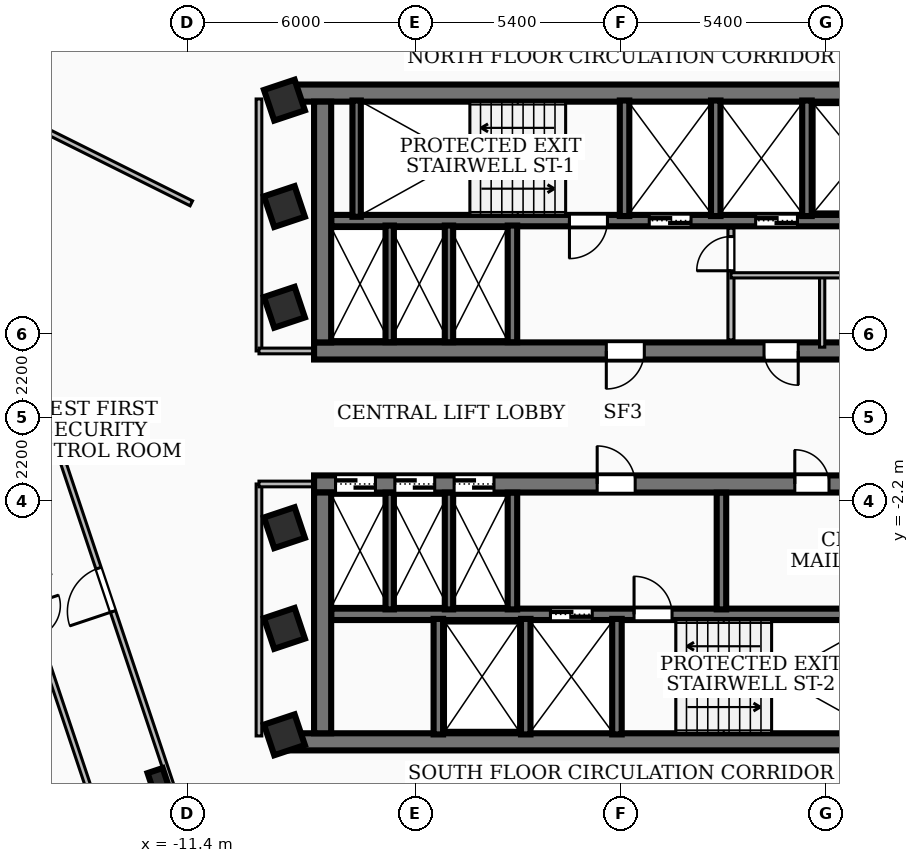
"""IFC4 building model, lengths in metres.
Left out: names, types, materials, properties, quantities, classifications, styles, units other than length and angle.
Written with IfcOpenShell. Run it as: python <this file> out.ifc"""

import sys

from ifc_helpers import new_model, si_unit, direction, frame, frame_2d, origin, origin_2d, place, context, subcontext, project, spatial, rectangle, i_section, extrude, element, fill, save


model = new_model("IFC4")
c1 = context("Model", 3, precision=1e-05, world=origin(), true_north=direction((0.0, 1.0)))
c2 = subcontext(c1, "Body", "Model", "MODEL_VIEW")
j1 = project(units=[si_unit("LENGTHUNIT", "METRE"), si_unit("PLANEANGLEUNIT", "RADIAN")], contexts=[c1])
p1 = place(None, origin())
s1 = spatial("IfcSite", under=j1, at=p1, CompositionType="ELEMENT")
p2 = place(p1, origin())
s2 = spatial("IfcBuilding", under=s1, at=p2, CompositionType="ELEMENT")
p3 = place(p2, frame((0.0, 0.0, 163.08)))
s3 = spatial("IfcBuildingStorey", under=s2, at=p3, CompositionType="ELEMENT", Elevation=163.08)
p4 = place(p3, frame((-8.78, 8.535, 0.0), z_axis=(0.0, 0.0, 1.0), x_axis=(1.0, 0.0, 0.0)))
e1 = element("IfcWall", 1, at=p4, inside=s3, PredefinedType="SHEAR", context=c2, shape_type="SweptSolid", body=[
    extrude(rectangle(XDim=17.56, YDim=0.45, at=frame_2d((8.78, 0.0))), origin(), (0.0, 0.0, 1.0), 3.34),
])
p5 = place(p3, frame((8.07, 1.75, 0.0), z_axis=(0.0, 0.0, 1.0), x_axis=(-1.0, 0.0, 0.0)))
e2 = element("IfcWall", 2, at=p5, inside=s3, PredefinedType="SHEAR", context=c2, shape_type="SweptSolid", body=[
    extrude(rectangle(XDim=16.14, YDim=0.45, at=frame_2d((8.07, 0.0))), origin(), (0.0, 0.0, 1.0), 3.34),
])
p6 = place(p5, frame((7.45, 0.0, 0.0)))
e3 = element("IfcOpeningElement", 3, at=p6, cuts=e2, PredefinedType="OPENING", context=c2, shape_type="SweptSolid", body=[
    extrude(rectangle(XDim=1.0, YDim=2.1, at=frame_2d((0.5, 1.05))), frame((0.0, 0.235, 0.0), z_axis=(0.0, -1.0, 0.0), x_axis=(1.0, 0.0, 0.0)), (0.0, 0.0, 1.0), 0.47),
])
p7 = place(p5, frame((3.4, 0.0, 0.0)))
e4 = element("IfcOpeningElement", 4, at=p7, cuts=e2, PredefinedType="OPENING", context=c2, shape_type="SweptSolid", body=[
    extrude(rectangle(XDim=0.9, YDim=2.06, at=frame_2d((0.45, 1.03))), frame((0.0, 0.235, 0.0), z_axis=(0.0, -1.0, 0.0), x_axis=(1.0, 0.0, 0.0)), (0.0, 0.0, 1.0), 0.47),
])
p8 = place(p5, frame((1.1, 0.0, 0.0)))
e5 = element("IfcOpeningElement", 5, at=p8, cuts=e2, PredefinedType="OPENING", context=c2, shape_type="SweptSolid", body=[
    extrude(rectangle(XDim=0.9, YDim=2.06, at=frame_2d((0.45, 1.03))), frame((0.0, 0.235, 0.0), z_axis=(0.0, -1.0, 0.0), x_axis=(1.0, 0.0, 0.0)), (0.0, 0.0, 1.0), 0.47),
])
p9 = place(p3, frame((-7.845, 1.975, 0.0), z_axis=(0.0, 0.0, 1.0), x_axis=(0.0, 1.0, 0.0)))
e6 = element("IfcWall", 6, at=p9, inside=s3, PredefinedType="SHEAR", context=c2, shape_type="SweptSolid", body=[
    extrude(rectangle(XDim=6.335, YDim=0.45, at=frame_2d((3.167, 0.0))), origin(), (0.0, 0.0, 1.0), 3.34),
])
p10 = place(p3, frame((7.62, 5.18, 0.0), z_axis=(0.0, 0.0, 1.0), x_axis=(-1.0, 0.0, 0.0)))
e7 = element("IfcWall", 7, at=p10, inside=s3, PredefinedType="SOLIDWALL", context=c2, shape_type="SweptSolid", body=[
    extrude(rectangle(XDim=15.24, YDim=0.3, at=frame_2d((7.62, 0.0))), origin(), (0.0, 0.0, 1.0), 3.34),
])
p11 = place(p10, frame((5.77, 0.0, 0.0)))
e8 = element("IfcOpeningElement", 8, at=p11, cuts=e7, PredefinedType="OPENING", context=c2, shape_type="SweptSolid", body=[
    extrude(rectangle(XDim=1.1, YDim=2.15, at=frame_2d((0.55, 1.075))), frame((0.0, 0.16, 0.0), z_axis=(0.0, -1.0, 0.0), x_axis=(1.0, 0.0, 0.0)), (0.0, 0.0, 1.0), 0.32),
])
p12 = place(p10, frame((2.97, 0.0, 0.0)))
e9 = element("IfcOpeningElement", 9, at=p12, cuts=e7, PredefinedType="OPENING", context=c2, shape_type="SweptSolid", body=[
    extrude(rectangle(XDim=1.1, YDim=2.15, at=frame_2d((0.55, 1.075))), frame((0.0, 0.16, 0.0), z_axis=(0.0, -1.0, 0.0), x_axis=(1.0, 0.0, 0.0)), (0.0, 0.0, 1.0), 0.32),
])
p13 = place(p10, frame((7.97, 0.0, 0.0)))
e10 = element("IfcOpeningElement", 10, at=p13, cuts=e7, PredefinedType="OPENING", context=c2, shape_type="SweptSolid", body=[
    extrude(rectangle(XDim=1.0, YDim=2.1, at=frame_2d((0.5, 1.05))), frame((0.0, 0.16, 0.0), z_axis=(0.0, -1.0, 0.0), x_axis=(1.0, 0.0, 0.0)), (0.0, 0.0, 1.0), 0.32),
])
p14 = place(p3, frame((8.78, -8.535, 0.0), z_axis=(0.0, 0.0, 1.0), x_axis=(-1.0, 0.0, 0.0)))
e11 = element("IfcWall", 11, at=p14, inside=s3, PredefinedType="SHEAR", context=c2, shape_type="SweptSolid", body=[
    extrude(rectangle(XDim=17.56, YDim=0.45, at=frame_2d((8.78, 0.0))), origin(), (0.0, 0.0, 1.0), 3.34),
])
p15 = place(p3, frame((-8.07, -1.75, 0.0), z_axis=(0.0, 0.0, 1.0), x_axis=(1.0, 0.0, 0.0)))
e12 = element("IfcWall", 12, at=p15, inside=s3, PredefinedType="SHEAR", context=c2, shape_type="SweptSolid", body=[
    extrude(rectangle(XDim=16.14, YDim=0.45, at=frame_2d((8.07, 0.0))), origin(), (0.0, 0.0, 1.0), 3.34),
])
p16 = place(p15, frame((7.45, 0.0, 0.0)))
e13 = element("IfcOpeningElement", 13, at=p16, cuts=e12, PredefinedType="OPENING", context=c2, shape_type="SweptSolid", body=[
    extrude(rectangle(XDim=1.0, YDim=2.1, at=frame_2d((0.5, 1.05))), frame((0.0, 0.235, 0.0), z_axis=(0.0, -1.0, 0.0), x_axis=(1.0, 0.0, 0.0)), (0.0, 0.0, 1.0), 0.47),
])
p17 = place(p15, frame((12.65, 0.0, 0.0)))
e14 = element("IfcOpeningElement", 14, at=p17, cuts=e12, PredefinedType="OPENING", context=c2, shape_type="SweptSolid", body=[
    extrude(rectangle(XDim=0.9, YDim=2.06, at=frame_2d((0.45, 1.03))), frame((0.0, 0.235, 0.0), z_axis=(0.0, -1.0, 0.0), x_axis=(1.0, 0.0, 0.0)), (0.0, 0.0, 1.0), 0.47),
])
p18 = place(p15, frame((0.565, 0.0, 0.0)))
e15 = element("IfcOpeningElement", 15, at=p18, cuts=e12, PredefinedType="OPENING", context=c2, shape_type="SweptSolid", body=[
    extrude(rectangle(XDim=1.05, YDim=2.15, at=frame_2d((0.525, 1.075))), frame((0.0, 0.235, 0.0), z_axis=(0.0, -1.0, 0.0), x_axis=(1.0, 0.0, 0.0)), (0.0, 0.0, 1.0), 0.47),
])
p19 = place(p15, frame((2.125, 0.0, 0.0)))
e16 = element("IfcOpeningElement", 16, at=p19, cuts=e12, PredefinedType="OPENING", context=c2, shape_type="SweptSolid", body=[
    extrude(rectangle(XDim=1.05, YDim=2.15, at=frame_2d((0.525, 1.075))), frame((0.0, 0.235, 0.0), z_axis=(0.0, -1.0, 0.0), x_axis=(1.0, 0.0, 0.0)), (0.0, 0.0, 1.0), 0.47),
])
p20 = place(p15, frame((3.685, 0.0, 0.0)))
e17 = element("IfcOpeningElement", 17, at=p20, cuts=e12, PredefinedType="OPENING", context=c2, shape_type="SweptSolid", body=[
    extrude(rectangle(XDim=1.05, YDim=2.15, at=frame_2d((0.525, 1.075))), frame((0.0, 0.235, 0.0), z_axis=(0.0, -1.0, 0.0), x_axis=(1.0, 0.0, 0.0)), (0.0, 0.0, 1.0), 0.47),
])
p21 = place(p3, frame((-7.845, -8.31, 0.0), z_axis=(0.0, 0.0, 1.0), x_axis=(0.0, 1.0, 0.0)))
e18 = element("IfcWall", 18, at=p21, inside=s3, PredefinedType="SHEAR", context=c2, shape_type="SweptSolid", body=[
    extrude(rectangle(XDim=6.335, YDim=0.45, at=frame_2d((3.167, 0.0))), origin(), (0.0, 0.0, 1.0), 3.34),
])
p22 = place(p3, frame((-7.62, -5.18, 0.0), z_axis=(0.0, 0.0, 1.0), x_axis=(1.0, 0.0, 0.0)))
e19 = element("IfcWall", 19, at=p22, inside=s3, PredefinedType="SOLIDWALL", context=c2, shape_type="SweptSolid", body=[
    extrude(rectangle(XDim=15.24, YDim=0.3, at=frame_2d((7.62, 0.0))), origin(), (0.0, 0.0, 1.0), 3.34),
])
p23 = place(p22, frame((5.77, 0.0, 0.0)))
e20 = element("IfcOpeningElement", 20, at=p23, cuts=e19, PredefinedType="OPENING", context=c2, shape_type="SweptSolid", body=[
    extrude(rectangle(XDim=1.1, YDim=2.15, at=frame_2d((0.55, 1.075))), frame((0.0, 0.16, 0.0), z_axis=(0.0, -1.0, 0.0), x_axis=(1.0, 0.0, 0.0)), (0.0, 0.0, 1.0), 0.32),
])
p24 = place(p22, frame((7.97, 0.0, 0.0)))
e21 = element("IfcOpeningElement", 21, at=p24, cuts=e19, PredefinedType="OPENING", context=c2, shape_type="SweptSolid", body=[
    extrude(rectangle(XDim=1.0, YDim=2.1, at=frame_2d((0.5, 1.05))), frame((0.0, 0.16, 0.0), z_axis=(0.0, -1.0, 0.0), x_axis=(1.0, 0.0, 0.0)), (0.0, 0.0, 1.0), 0.32),
])
p25 = place(p3, frame((-6.95, 5.28, 0.0), z_axis=(0.0, 0.0, 1.0), x_axis=(0.0, 1.0, 0.0)))
e22 = element("IfcWall", 22, at=p25, inside=s3, PredefinedType="SOLIDWALL", context=c2, shape_type="SweptSolid", body=[
    extrude(rectangle(XDim=3.06, YDim=0.22, at=frame_2d((1.53, 0.0))), origin(), (0.0, 0.0, 1.0), 3.34),
])
for number, where, z_axis, x_axis in (
    (23, (0.1, 5.3, 0.0), (0.0, 0.0, 1.0), (0.0, 1.0, 0.0)),
    (24, (2.5, 5.3, 0.0), (0.0, 0.0, 1.0), (0.0, 1.0, 0.0)),
    (25, (4.9, 5.3, 0.0), (0.0, 0.0, 1.0), (0.0, 1.0, 0.0)),
):
    element("IfcWall", number, at=place(p3, frame(where, z_axis=z_axis, x_axis=x_axis)), inside=s3, PredefinedType="SOLIDWALL", context=c2, shape_type="SweptSolid", body=[
        extrude(rectangle(XDim=3.04, YDim=0.25, at=frame_2d((1.52, 0.0))), origin(), (0.0, 0.0, 1.0), 3.34),
    ])
p26 = place(p3, frame((-2.85, 1.98, 0.0), z_axis=(0.0, 0.0, 1.0), x_axis=(0.0, 1.0, 0.0)))
e26 = element("IfcWall", 26, at=p26, inside=s3, PredefinedType="SOLIDWALL", context=c2, shape_type="SweptSolid", body=[
    extrude(rectangle(XDim=3.07, YDim=0.25, at=frame_2d((1.535, 0.0))), origin(), (0.0, 0.0, 1.0), 3.34),
])
for number, where, z_axis, x_axis in (
    (27, (-0.1, -8.34, 0.0), (0.0, 0.0, 1.0), (0.0, 1.0, 0.0)),
    (28, (-2.5, -8.34, 0.0), (0.0, 0.0, 1.0), (0.0, 1.0, 0.0)),
    (29, (-4.8, -8.34, 0.0), (0.0, 0.0, 1.0), (0.0, 1.0, 0.0)),
):
    element("IfcWall", number, at=place(p3, frame(where, z_axis=z_axis, x_axis=x_axis)), inside=s3, PredefinedType="SOLIDWALL", context=c2, shape_type="SweptSolid", body=[
        extrude(rectangle(XDim=3.04, YDim=0.25, at=frame_2d((1.52, 0.0))), origin(), (0.0, 0.0, 1.0), 3.34),
    ])
for number, where, z_axis, x_axis in (
    (30, (-2.85, -5.05, 0.0), (0.0, 0.0, 1.0), (0.0, 1.0, 0.0)),
    (31, (2.65, -5.05, 0.0), (0.0, 0.0, 1.0), (0.0, 1.0, 0.0)),
):
    element("IfcWall", number, at=place(p3, frame(where, z_axis=z_axis, x_axis=x_axis)), inside=s3, PredefinedType="SOLIDWALL", context=c2, shape_type="SweptSolid", body=[
        extrude(rectangle(XDim=3.07, YDim=0.25, at=frame_2d((1.535, 0.0))), origin(), (0.0, 0.0, 1.0), 3.34),
    ])
for number, where, z_axis, x_axis in (
    (32, (-6.08, 1.98, 0.0), (0.0, 0.0, 1.0), (0.0, 1.0, 0.0)),
    (33, (-4.52, 1.98, 0.0), (0.0, 0.0, 1.0), (0.0, 1.0, 0.0)),
    (34, (-6.08, -5.05, 0.0), (0.0, 0.0, 1.0), (0.0, 1.0, 0.0)),
    (35, (-4.52, -5.05, 0.0), (0.0, 0.0, 1.0), (0.0, 1.0, 0.0)),
):
    element("IfcWall", number, at=place(p3, frame(where, z_axis=z_axis, x_axis=x_axis)), inside=s3, PredefinedType="SOLIDWALL", context=c2, shape_type="SweptSolid", body=[
        extrude(rectangle(XDim=3.07, YDim=0.22, at=frame_2d((1.535, 0.0))), origin(), (0.0, 0.0, 1.0), 3.34),
    ])
for number, where, z_axis, x_axis in (
    (36, (-8.85, -5.55, 0.0), (0.0, 0.0, 1.0), (0.948, 0.317, 0.0)),
    (37, (-8.85, -2.9, 0.0), (0.0, 0.0, 1.0), (0.948, 0.317, 0.0)),
    (38, (-8.85, 2.9, 0.0), (0.0, 0.0, 1.0), (0.948, 0.317, 0.0)),
    (39, (-8.85, 5.55, 0.0), (0.0, 0.0, 1.0), (0.948, 0.317, 0.0)),
    (40, (-8.85, 8.35, 0.0), (0.0, 0.0, 1.0), (0.948, 0.317, 0.0)),
    (41, (-8.85, -8.35, 0.0), (0.0, 0.0, 1.0), (0.948, 0.317, 0.0)),
):
    element("IfcColumn", number, at=place(p3, frame(where, z_axis=z_axis, x_axis=x_axis)), inside=s3, PredefinedType="COLUMN", context=c2, shape_type="SweptSolid", body=[
        extrude(rectangle(XDim=0.85, YDim=0.85, at=origin_2d()), origin(), (0.0, 0.0, 1.0), 3.6),
    ])
p27 = place(p3, frame((-12.106, -9.731, 0.0), z_axis=(0.0, 0.0, 1.0), x_axis=(0.948323655206, 0.317304656405, 0.0)))
e42 = element("IfcColumn", 42, at=p27, inside=s3, PredefinedType="COLUMN", context=c2, shape_type="SweptSolid", body=[
    extrude(i_section(OverallWidth=0.418, OverallDepth=0.927, WebThickness=0.019, FlangeThickness=0.032, at=origin_2d()), origin(), (0.0, 0.0, 1.0), 3.6),
])
p28 = place(p3, frame((-16.873, 9.581, 0.0), z_axis=(0.0, 0.0, 1.0), x_axis=(0.94829606055, 0.317387116224, 0.0)))
e43 = element("IfcWall", 43, at=p28, inside=s3, PredefinedType="SOLIDWALL", context=c2, shape_type="SweptSolid", body=[
    extrude(rectangle(XDim=6.758, YDim=0.22, at=frame_2d((3.379, 0.0))), origin(), (0.0, 0.0, 1.0), 3.34),
])
p29 = place(p3, frame((2.9, 2.04, 0.0), z_axis=(0.0, 0.0, 1.0), x_axis=(0.0, 1.0, 0.0)))
e44 = element("IfcWall", 44, at=p29, inside=s3, PredefinedType="PARTITIONING", context=c2, shape_type="SweptSolid", body=[
    extrude(rectangle(XDim=2.94, YDim=0.16, at=frame_2d((1.47, 0.0))), origin(), (0.0, 0.0, 1.0), 2.57),
])
p30 = place(p29, frame((1.82, 0.0, 0.0)))
e45 = element("IfcOpeningElement", 45, at=p30, cuts=e44, PredefinedType="OPENING", context=c2, shape_type="SweptSolid", body=[
    extrude(rectangle(XDim=0.9, YDim=2.06, at=frame_2d((0.45, 1.03))), frame((0.0, 0.09, 0.0), z_axis=(0.0, -1.0, 0.0), x_axis=(1.0, 0.0, 0.0)), (0.0, 0.0, 1.0), 0.18),
])
p31 = place(p3, frame((2.9, 3.74, 0.0), z_axis=(0.0, 0.0, 1.0), x_axis=(1.0, 0.0, 0.0)))
e46 = element("IfcWall", 46, at=p31, inside=s3, PredefinedType="PARTITIONING", context=c2, shape_type="SweptSolid", body=[
    extrude(rectangle(XDim=4.65, YDim=0.138, at=frame_2d((2.325, 0.0))), origin(), (0.0, 0.0, 1.0), 3.34),
])
p32 = place(p3, frame((5.3, 1.85, 0.0), z_axis=(0.0, 0.0, 1.0), x_axis=(0.0, 1.0, 0.0)))
e47 = element("IfcWall", 47, at=p32, inside=s3, PredefinedType="PARTITIONING", context=c2, shape_type="SweptSolid", body=[
    extrude(rectangle(XDim=1.89, YDim=0.138, at=frame_2d((0.945, 0.0))), origin(), (0.0, 0.0, 1.0), 2.57),
])
p33 = place(p3, frame((-9.52, 1.75, 0.0), z_axis=(0.0, 0.0, 1.0), x_axis=(0.0, 1.0, 0.0)))
e48 = element("IfcWall", 48, at=p33, inside=s3, PredefinedType="PARTITIONING", context=c2, shape_type="SweptSolid", body=[
    extrude(rectangle(XDim=6.63, YDim=0.15, at=frame_2d((3.315, 0.0))), origin(), (0.0, 0.0, 1.0), 3.34),
])
p34 = place(p3, frame((-7.85, 1.75, 0.0), z_axis=(0.0, 0.0, 1.0), x_axis=(-1.0, 0.0, 0.0)))
e49 = element("IfcWall", 49, at=p34, inside=s3, PredefinedType="PARTITIONING", context=c2, shape_type="SweptSolid", body=[
    extrude(rectangle(XDim=1.67, YDim=0.15, at=frame_2d((0.835, 0.0))), origin(), (0.0, 0.0, 1.0), 2.57),
])
p35 = place(p3, frame((-9.52, -8.38, 0.0), z_axis=(0.0, 0.0, 1.0), x_axis=(0.0, 1.0, 0.0)))
e50 = element("IfcWall", 50, at=p35, inside=s3, PredefinedType="PARTITIONING", context=c2, shape_type="SweptSolid", body=[
    extrude(rectangle(XDim=6.63, YDim=0.15, at=frame_2d((3.315, 0.0))), origin(), (0.0, 0.0, 1.0), 2.644),
])
p36 = place(p3, frame((-7.85, -1.75, 0.0), z_axis=(0.0, 0.0, 1.0), x_axis=(-1.0, 0.0, 0.0)))
e51 = element("IfcWall", 51, at=p36, inside=s3, PredefinedType="PARTITIONING", context=c2, shape_type="SweptSolid", body=[
    extrude(rectangle(XDim=1.67, YDim=0.15, at=frame_2d((0.835, 0.0))), origin(), (0.0, 0.0, 1.0), 2.57),
])
p37 = place(p3, frame((-11.3, 5.634, 0.0), z_axis=(0.0, 0.0, 1.0), x_axis=(-0.894904738475, 0.446257222972, 0.0)))
e52 = element("IfcWall", 52, at=p37, inside=s3, PredefinedType="PARTITIONING", context=c2, shape_type="SweptSolid", body=[
    extrude(rectangle(XDim=7.048, YDim=0.145, at=frame_2d((3.524, 0.0))), origin(), (0.0, 0.0, 1.0), 3.34),
])
p38 = place(p3, frame((-10.372, -14.037, 0.0), z_axis=(0.0, 0.0, 1.0), x_axis=(-0.317298382655, 0.94832575435, 0.0)))
e53 = element("IfcWall", 53, at=p38, inside=s3, PredefinedType="PARTITIONING", context=c2, shape_type="SweptSolid", body=[
    extrude(rectangle(XDim=20.041, YDim=0.145, at=frame_2d((10.021, 0.0))), origin(), (0.0, 0.0, 1.0), 2.644),
])
p39 = place(p38, frame((9.42, 0.0, 0.0)))
e54 = element("IfcOpeningElement", 54, at=p39, cuts=e53, PredefinedType="OPENING", context=c2, shape_type="SweptSolid", body=[
    extrude(rectangle(XDim=1.2, YDim=2.1, at=frame_2d((0.6, 1.05))), frame((0.0, 0.083, 0.0), z_axis=(0.0, -1.0, 0.0), x_axis=(1.0, 0.0, 0.0)), (0.0, 0.0, 1.0), 0.165),
])
p40 = place(p3, frame((-17.496, 0.7, 0.0), z_axis=(0.0, 0.0, 1.0), x_axis=(0.317299961245, -0.948325226172, 0.0)))
e55 = element("IfcWall", 55, at=p40, inside=s3, PredefinedType="PARTITIONING", context=c2, shape_type="SweptSolid", body=[
    extrude(rectangle(XDim=12.43, YDim=0.145, at=frame_2d((6.215, 0.0))), origin(), (0.0, 0.0, 1.0), 2.644),
])
p41 = place(p40, frame((4.515, 0.0, 0.0)))
e56 = element("IfcOpeningElement", 56, at=p41, cuts=e55, PredefinedType="OPENING", context=c2, shape_type="SweptSolid", body=[
    extrude(rectangle(XDim=0.86, YDim=2.04, at=frame_2d((0.43, 1.02))), frame((0.0, 0.083, 0.0), z_axis=(0.0, -1.0, 0.0), x_axis=(1.0, 0.0, 0.0)), (0.0, 0.0, 1.0), 0.165),
])
p42 = place(p40, frame((5.955, 0.0, 0.0)))
e57 = element("IfcOpeningElement", 57, at=p42, cuts=e55, PredefinedType="OPENING", context=c2, shape_type="SweptSolid", body=[
    extrude(rectangle(XDim=0.86, YDim=2.04, at=frame_2d((0.43, 1.02))), frame((0.0, 0.083, 0.0), z_axis=(0.0, -1.0, 0.0), x_axis=(1.0, 0.0, 0.0)), (0.0, 0.0, 1.0), 0.165),
])
p43 = place(p6, origin())
e58 = element("IfcDoor", 58, at=p43, inside=s3, OperationType="SINGLE_SWING_RIGHT", PredefinedType="DOOR", context=c2, shape_type="SweptSolid", body=[
    extrude(rectangle(XDim=1.0, YDim=2.1, at=frame_2d((0.5, 1.05))), frame((0.0, 0.025, 0.0), z_axis=(0.0, -1.0, 0.0), x_axis=(1.0, 0.0, 0.0)), (0.0, 0.0, 1.0), 0.05),
])
fill(e3, e58)
p44 = place(p16, origin())
e59 = element("IfcDoor", 59, at=p44, inside=s3, OperationType="SINGLE_SWING_LEFT", PredefinedType="DOOR", context=c2, shape_type="SweptSolid", body=[
    extrude(rectangle(XDim=1.0, YDim=2.1, at=frame_2d((0.5, 1.05))), frame((0.0, 0.025, 0.0), z_axis=(0.0, -1.0, 0.0), x_axis=(1.0, 0.0, 0.0)), (0.0, 0.0, 1.0), 0.05),
])
fill(e13, e59)
p45 = place(p11, origin())
e60 = element("IfcDoor", 60, at=p45, inside=s3, OperationType="DOUBLE_DOOR_SLIDING", PredefinedType="DOOR", context=c2, shape_type="SweptSolid", body=[
    extrude(rectangle(XDim=1.1, YDim=2.15, at=frame_2d((0.55, 1.075))), frame((0.0, 0.025, 0.0), z_axis=(0.0, -1.0, 0.0), x_axis=(1.0, 0.0, 0.0)), (0.0, 0.0, 1.0), 0.05),
])
fill(e8, e60)
p46 = place(p12, origin())
e61 = element("IfcDoor", 61, at=p46, inside=s3, OperationType="DOUBLE_DOOR_SLIDING", PredefinedType="DOOR", context=c2, shape_type="SweptSolid", body=[
    extrude(rectangle(XDim=1.1, YDim=2.15, at=frame_2d((0.55, 1.075))), frame((0.0, 0.025, 0.0), z_axis=(0.0, -1.0, 0.0), x_axis=(1.0, 0.0, 0.0)), (0.0, 0.0, 1.0), 0.05),
])
fill(e9, e61)
p47 = place(p13, origin())
e62 = element("IfcDoor", 62, at=p47, inside=s3, OperationType="SINGLE_SWING_RIGHT", PredefinedType="DOOR", context=c2, shape_type="SweptSolid", body=[
    extrude(rectangle(XDim=1.0, YDim=2.1, at=frame_2d((0.5, 1.05))), frame((0.0, 0.025, 0.0), z_axis=(0.0, -1.0, 0.0), x_axis=(1.0, 0.0, 0.0)), (0.0, 0.0, 1.0), 0.05),
])
fill(e10, e62)
p48 = place(p23, origin())
e63 = element("IfcDoor", 63, at=p48, inside=s3, OperationType="DOUBLE_DOOR_SLIDING", PredefinedType="DOOR", context=c2, shape_type="SweptSolid", body=[
    extrude(rectangle(XDim=1.1, YDim=2.15, at=frame_2d((0.55, 1.075))), frame((0.0, 0.025, 0.0), z_axis=(0.0, -1.0, 0.0), x_axis=(1.0, 0.0, 0.0)), (0.0, 0.0, 1.0), 0.05),
])
fill(e20, e63)
p49 = place(p24, origin())
e64 = element("IfcDoor", 64, at=p49, inside=s3, OperationType="SINGLE_SWING_LEFT", PredefinedType="DOOR", context=c2, shape_type="SweptSolid", body=[
    extrude(rectangle(XDim=1.0, YDim=2.1, at=frame_2d((0.5, 1.05))), frame((0.0, 0.025, 0.0), z_axis=(0.0, -1.0, 0.0), x_axis=(1.0, 0.0, 0.0)), (0.0, 0.0, 1.0), 0.05),
])
fill(e21, e64)
p50 = place(p17, origin())
e65 = element("IfcDoor", 65, at=p50, inside=s3, OperationType="SINGLE_SWING_LEFT", PredefinedType="DOOR", context=c2, shape_type="SweptSolid", body=[
    extrude(rectangle(XDim=0.9, YDim=2.06, at=frame_2d((0.45, 1.03))), frame((0.0, 0.025, 0.0), z_axis=(0.0, -1.0, 0.0), x_axis=(1.0, 0.0, 0.0)), (0.0, 0.0, 1.0), 0.05),
])
fill(e14, e65)
p51 = place(p18, origin())
e66 = element("IfcDoor", 66, at=p51, inside=s3, OperationType="DOUBLE_DOOR_SLIDING", PredefinedType="DOOR", context=c2, shape_type="SweptSolid", body=[
    extrude(rectangle(XDim=1.05, YDim=2.15, at=frame_2d((0.525, 1.075))), frame((0.0, 0.025, 0.0), z_axis=(0.0, -1.0, 0.0), x_axis=(1.0, 0.0, 0.0)), (0.0, 0.0, 1.0), 0.05),
])
fill(e15, e66)
p52 = place(p19, origin())
e67 = element("IfcDoor", 67, at=p52, inside=s3, OperationType="DOUBLE_DOOR_SLIDING", PredefinedType="DOOR", context=c2, shape_type="SweptSolid", body=[
    extrude(rectangle(XDim=1.05, YDim=2.15, at=frame_2d((0.525, 1.075))), frame((0.0, 0.025, 0.0), z_axis=(0.0, -1.0, 0.0), x_axis=(1.0, 0.0, 0.0)), (0.0, 0.0, 1.0), 0.05),
])
fill(e16, e67)
p53 = place(p20, origin())
e68 = element("IfcDoor", 68, at=p53, inside=s3, OperationType="DOUBLE_DOOR_SLIDING", PredefinedType="DOOR", context=c2, shape_type="SweptSolid", body=[
    extrude(rectangle(XDim=1.05, YDim=2.15, at=frame_2d((0.525, 1.075))), frame((0.0, 0.025, 0.0), z_axis=(0.0, -1.0, 0.0), x_axis=(1.0, 0.0, 0.0)), (0.0, 0.0, 1.0), 0.05),
])
fill(e17, e68)
p54 = place(p7, origin())
e69 = element("IfcDoor", 69, at=p54, inside=s3, OperationType="SINGLE_SWING_LEFT", PredefinedType="DOOR", context=c2, shape_type="SweptSolid", body=[
    extrude(rectangle(XDim=0.9, YDim=2.06, at=frame_2d((0.45, 1.03))), frame((0.0, 0.025, 0.0), z_axis=(0.0, -1.0, 0.0), x_axis=(1.0, 0.0, 0.0)), (0.0, 0.0, 1.0), 0.05),
])
fill(e4, e69)
p55 = place(p30, origin())
e70 = element("IfcDoor", 70, at=p55, inside=s3, OperationType="SINGLE_SWING_LEFT", PredefinedType="DOOR", context=c2, shape_type="SweptSolid", body=[
    extrude(rectangle(XDim=0.9, YDim=2.06, at=frame_2d((0.45, 1.03))), frame((0.0, 0.025, 0.0), z_axis=(0.0, -1.0, 0.0), x_axis=(1.0, 0.0, 0.0)), (0.0, 0.0, 1.0), 0.05),
])
fill(e45, e70)
p56 = place(p39, origin())
e71 = element("IfcDoor", 71, at=p56, inside=s3, OperationType="SINGLE_SWING_LEFT", PredefinedType="DOOR", context=c2, shape_type="SweptSolid", body=[
    extrude(rectangle(XDim=1.2, YDim=2.1, at=frame_2d((0.6, 1.05))), frame((0.0, 0.025, 0.0), z_axis=(0.0, -1.0, 0.0), x_axis=(1.0, 0.0, 0.0)), (0.0, 0.0, 1.0), 0.05),
])
fill(e54, e71)
save(model, sys.argv[1])
